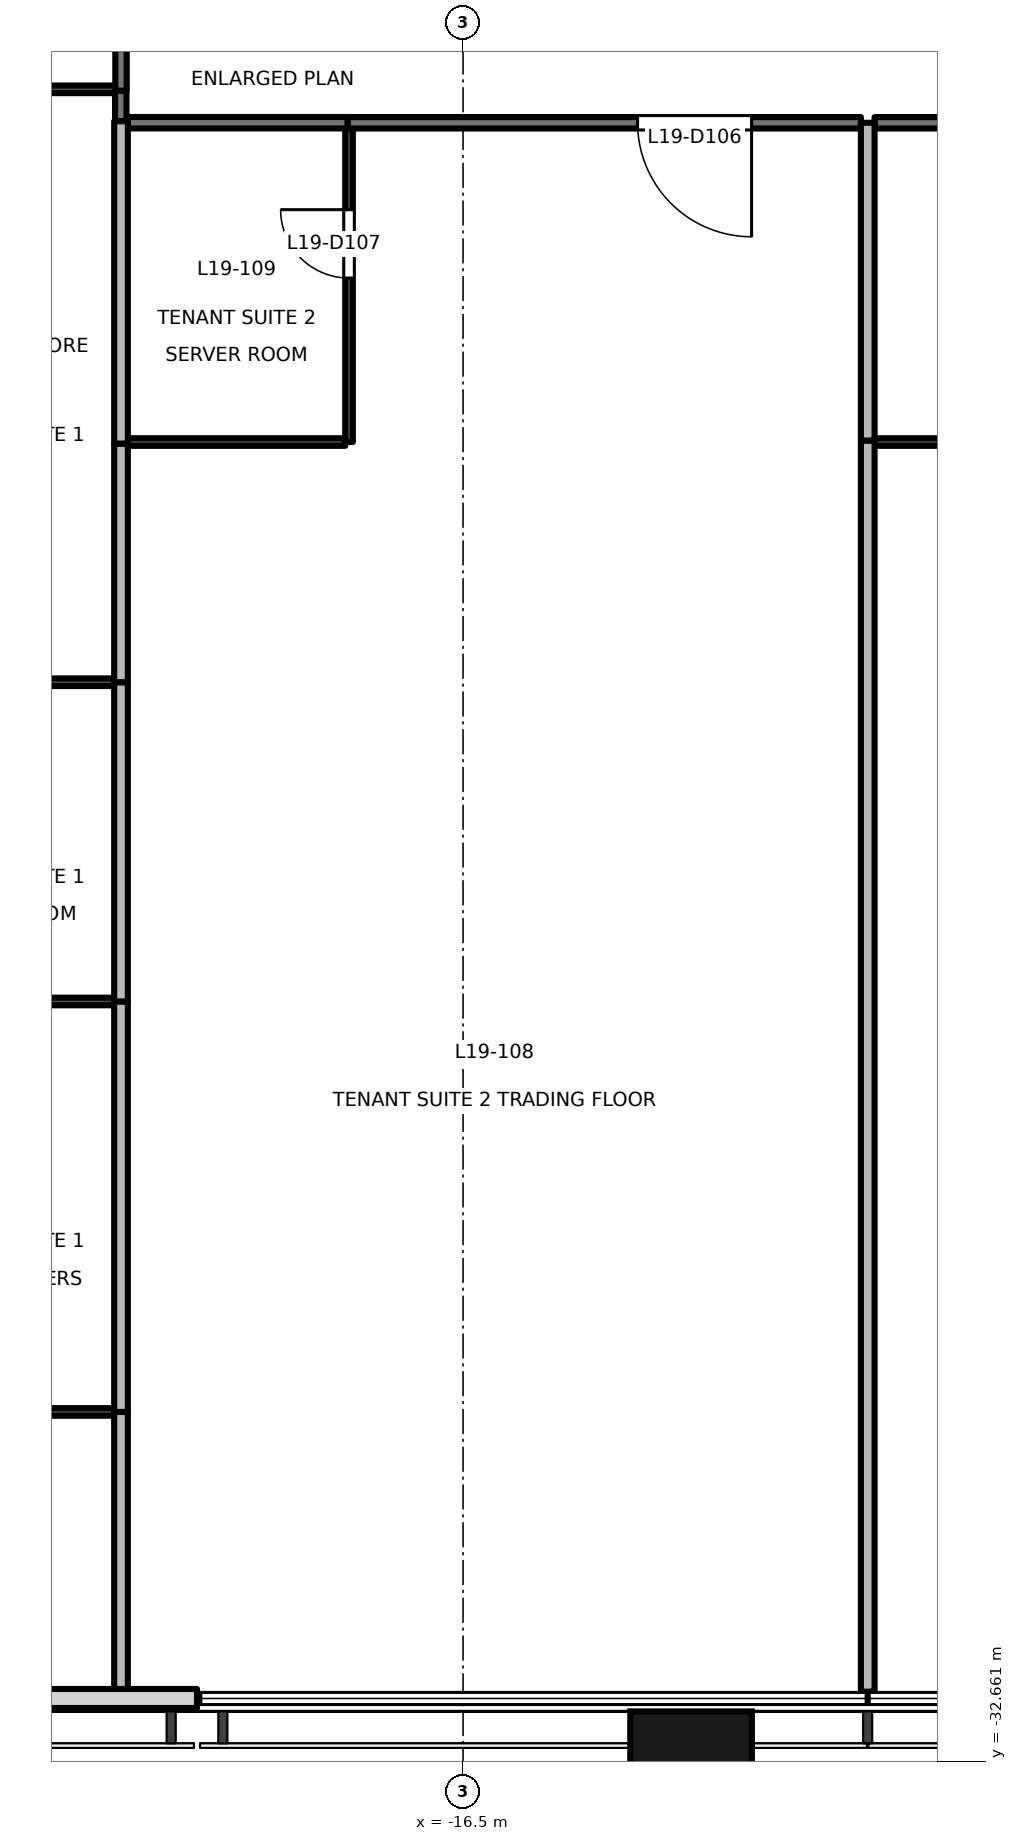
"""IFC4 building model, lengths in metres.
Left out: names, types, materials, properties, quantities, classifications, styles, units other than length and angle.
Written with IfcOpenShell. Run it as: python <this file> out.ifc"""

import sys

from ifc_helpers import new_model, si_unit, direction, frame, frame_2d, origin, origin_2d, place, context, subcontext, project, spatial, rectangle, extrude, element, fill, save


model = new_model("IFC4")
c1 = context("Model", 3, precision=1e-05, world=origin(), true_north=direction((0.0, 1.0)))
c2 = subcontext(c1, "Body", "Model", "MODEL_VIEW")
j1 = project(units=[si_unit("LENGTHUNIT", "METRE"), si_unit("PLANEANGLEUNIT", "RADIAN")], contexts=[c1])
p1 = place(None, origin())
s1 = spatial("IfcSite", under=j1, at=p1, CompositionType="ELEMENT")
p2 = place(p1, origin())
s2 = spatial("IfcBuilding", under=s1, at=p2, CompositionType="ELEMENT")
p3 = place(p2, frame((0.0, 0.0, 87.7)))
s3 = spatial("IfcBuildingStorey", under=s2, at=p3, CompositionType="ELEMENT", Elevation=87.7)
p4 = place(p3, frame((-13.5, -32.9, -0.2), z_axis=(0.0, 0.0, 1.0), x_axis=(1.0, 0.0, 0.0)))
e1 = element("IfcColumn", 1, at=p4, inside=s3, PredefinedType="COLUMN", context=c2, shape_type="SweptSolid", body=[
    extrude(rectangle(XDim=1.6, YDim=1.8, at=origin_2d()), origin(), (0.0, 0.0, 1.0), 4.0),
])
p5 = place(p3, frame((-22.955, -31.83, 0.0), z_axis=(0.0, 0.0, 1.0), x_axis=(1.0, 0.0, 0.0)))
e2 = element("IfcWall", 2, at=p5, inside=s3, PredefinedType="SOLIDWALL", context=c2, shape_type="SweptSolid", body=[
    extrude(rectangle(XDim=2.955, YDim=0.25, at=frame_2d((1.478, 0.0))), origin(), (0.0, 0.0, 1.0), 3.8),
])
p6 = place(p3, frame((-21.0, -10.68, 0.0), z_axis=(0.0, 0.0, 1.0), x_axis=(0.0, 1.0, 0.0)))
e3 = element("IfcWall", 3, at=p6, inside=s3, PredefinedType="PARTITIONING", context=c2, shape_type="SweptSolid", body=[
    extrude(rectangle(XDim=6.0, YDim=0.15, at=frame_2d((3.0, 0.0))), origin(), (0.0, 0.0, 1.0), 3.8),
])
p7 = place(p6, frame((3.7, 0.0, 0.0)))
e4 = element("IfcOpeningElement", 4, at=p7, cuts=e3, PredefinedType="OPENING", context=c2, shape_type="SweptSolid", body=[
    extrude(rectangle(XDim=0.9, YDim=2.1, at=frame_2d((0.45, 1.05))), frame((0.0, 0.085, 0.0), z_axis=(0.0, -1.0, 0.0), x_axis=(1.0, 0.0, 0.0)), (0.0, 0.0, 1.0), 0.171),
])
p8 = place(p3, frame((-21.003, -11.08, 0.0), z_axis=(0.0, 0.0, 1.0), x_axis=(0.0, 1.0, 0.0)))
e5 = element("IfcWall", 5, at=p8, inside=s3, PredefinedType="PARTITIONING", context=c2, shape_type="SweptSolid", body=[
    extrude(rectangle(XDim=0.4, YDim=0.15, at=frame_2d((0.2, 0.0))), origin(), (0.0, 0.0, 1.0), 3.8),
])
p9 = place(p3, frame((-11.266, -11.1, 0.0), z_axis=(0.0, 0.0, 1.0), x_axis=(-1.0, 0.0, 0.0)))
e6 = element("IfcWall", 6, at=p9, inside=s3, PredefinedType="PARTITIONING", context=c2, shape_type="SweptSolid", body=[
    extrude(rectangle(XDim=6.754, YDim=0.15, at=frame_2d((3.377, 0.0))), origin(), (0.0, 0.0, 1.0), 2.8),
])
p10 = place(p9, frame((1.438, 0.0, 0.0)))
e7 = element("IfcOpeningElement", 7, at=p10, cuts=e6, PredefinedType="OPENING", context=c2, shape_type="SweptSolid", body=[
    extrude(rectangle(XDim=1.5, YDim=2.1, at=frame_2d((0.75, 1.05))), frame((0.0, 0.085, 0.0), z_axis=(0.0, -1.0, 0.0), x_axis=(1.0, 0.0, 0.0)), (0.0, 0.0, 1.0), 0.171),
])
p11 = place(p3, frame((-18.02, -11.099, 0.0), z_axis=(0.0, 0.0, 1.0), x_axis=(-1.0, 0.0, 0.0)))
e8 = element("IfcWall", 8, at=p11, inside=s3, PredefinedType="PARTITIONING", context=c2, shape_type="SweptSolid", body=[
    extrude(rectangle(XDim=2.89, YDim=0.15, at=frame_2d((1.445, 0.0))), origin(), (0.0, 0.0, 1.0), 3.8),
])
p12 = place(p3, frame((-5.156, -11.1, 0.0), z_axis=(0.0, 0.0, 1.0), x_axis=(-1.0, 0.0, 0.0)))
e9 = element("IfcWall", 9, at=p12, inside=s3, PredefinedType="PARTITIONING", context=c2, shape_type="SweptSolid", body=[
    extrude(rectangle(XDim=5.93, YDim=0.15, at=frame_2d((2.965, 0.0))), origin(), (0.0, 0.0, 1.0), 2.8),
])
p13 = place(p3, frame((-23.95, -28.06, 0.0), z_axis=(0.0, 0.0, 1.0), x_axis=(1.0, 0.0, 0.0)))
e10 = element("IfcWall", 10, at=p13, inside=s3, PredefinedType="PARTITIONING", context=c2, shape_type="SweptSolid", body=[
    extrude(rectangle(XDim=2.86, YDim=0.1, at=frame_2d((1.43, 0.0))), origin(), (0.0, 0.0, 1.0), 3.8),
])
p14 = place(p3, frame((-21.075, -10.66, 0.0), z_axis=(0.0, 0.0, 1.0), x_axis=(-1.0, 0.0, 0.0)))
e11 = element("IfcWall", 11, at=p14, inside=s3, PredefinedType="PARTITIONING", context=c2, shape_type="SweptSolid", body=[
    extrude(rectangle(XDim=2.875, YDim=0.1, at=frame_2d((1.438, 0.0))), origin(), (0.0, 0.0, 1.0), 3.8),
])
p15 = place(p3, frame((-21.0, -28.06, 0.0), z_axis=(0.0, 0.0, 1.0), x_axis=(0.0, -1.0, 0.0)))
e12 = element("IfcWall", 12, at=p15, inside=s3, PredefinedType="PARTITIONING", context=c2, shape_type="SweptSolid", body=[
    extrude(rectangle(XDim=3.68, YDim=0.18, at=frame_2d((1.84, 0.0))), origin(), (0.0, 0.0, 1.0), 3.8),
])
p16 = place(p3, frame((-23.95, -22.66, 0.0), z_axis=(0.0, 0.0, 1.0), x_axis=(1.0, 0.0, 0.0)))
e13 = element("IfcWall", 13, at=p16, inside=s3, PredefinedType="PARTITIONING", context=c2, shape_type="SweptSolid", body=[
    extrude(rectangle(XDim=2.86, YDim=0.1, at=frame_2d((1.43, 0.0))), origin(), (0.0, 0.0, 1.0), 3.8),
])
p17 = place(p3, frame((-21.0, -22.66, 0.0), z_axis=(0.0, 0.0, 1.0), x_axis=(0.0, -1.0, 0.0)))
e14 = element("IfcWall", 14, at=p17, inside=s3, PredefinedType="PARTITIONING", context=c2, shape_type="SweptSolid", body=[
    extrude(rectangle(XDim=5.4, YDim=0.18, at=frame_2d((2.7, 0.0))), origin(), (0.0, 0.0, 1.0), 3.8),
])
p18 = place(p3, frame((-23.95, -18.46, 0.0), z_axis=(0.0, 0.0, 1.0), x_axis=(1.0, 0.0, 0.0)))
e15 = element("IfcWall", 15, at=p18, inside=s3, PredefinedType="PARTITIONING", context=c2, shape_type="SweptSolid", body=[
    extrude(rectangle(XDim=2.86, YDim=0.1, at=frame_2d((1.43, 0.0))), origin(), (0.0, 0.0, 1.0), 3.8),
])
p19 = place(p3, frame((-21.0, -18.46, 0.0), z_axis=(0.0, 0.0, 1.0), x_axis=(0.0, -1.0, 0.0)))
e16 = element("IfcWall", 16, at=p19, inside=s3, PredefinedType="PARTITIONING", context=c2, shape_type="SweptSolid", body=[
    extrude(rectangle(XDim=4.2, YDim=0.18, at=frame_2d((2.1, 0.0))), origin(), (0.0, 0.0, 1.0), 3.8),
])
p20 = place(p3, frame((-21.0, -15.32, 0.0), z_axis=(0.0, 0.0, 1.0), x_axis=(0.0, -1.0, 0.0)))
e17 = element("IfcWall", 17, at=p20, inside=s3, PredefinedType="PARTITIONING", context=c2, shape_type="SweptSolid", body=[
    extrude(rectangle(XDim=3.14, YDim=0.18, at=frame_2d((1.57, 0.0))), origin(), (0.0, 0.0, 1.0), 3.8),
])
p21 = place(p3, frame((-21.0, -11.08, 0.0), z_axis=(0.0, 0.0, 1.0), x_axis=(0.0, -1.0, 0.0)))
e18 = element("IfcWall", 18, at=p21, inside=s3, PredefinedType="PARTITIONING", context=c2, shape_type="SweptSolid", body=[
    extrude(rectangle(XDim=4.24, YDim=0.18, at=frame_2d((2.12, 0.0))), origin(), (0.0, 0.0, 1.0), 3.8),
])
p22 = place(p3, frame((-20.91, -15.3, 0.0), z_axis=(0.0, 0.0, 1.0), x_axis=(1.0, 0.0, 0.0)))
e19 = element("IfcWall", 19, at=p22, inside=s3, PredefinedType="PARTITIONING", context=c2, shape_type="SweptSolid", body=[
    extrude(rectangle(XDim=2.86, YDim=0.1, at=frame_2d((1.43, 0.0))), origin(), (0.0, 0.0, 1.0), 3.8),
])
p23 = place(p3, frame((-18.0, -15.3, 0.0), z_axis=(0.0, 0.0, 1.0), x_axis=(0.0, 1.0, 0.0)))
e20 = element("IfcWall", 20, at=p23, inside=s3, PredefinedType="PARTITIONING", context=c2, shape_type="SweptSolid", body=[
    extrude(rectangle(XDim=4.125, YDim=0.1, at=frame_2d((2.062, 0.0))), origin(), (0.0, 0.0, 1.0), 3.8),
])
p24 = place(p23, frame((2.157, 0.0, 0.0)))
e21 = element("IfcOpeningElement", 21, at=p24, cuts=e20, PredefinedType="OPENING", context=c2, shape_type="SweptSolid", body=[
    extrude(rectangle(XDim=0.9, YDim=2.1, at=frame_2d((0.45, 1.05))), frame((0.0, 0.061, 0.0), z_axis=(0.0, -1.0, 0.0), x_axis=(1.0, 0.0, 0.0)), (0.0, 0.0, 1.0), 0.121),
])
p25 = place(p3, frame((-11.176, -15.28, 0.0), z_axis=(0.0, 0.0, 1.0), x_axis=(0.0, -1.0, 0.0)))
e22 = element("IfcWall", 22, at=p25, inside=s3, PredefinedType="PARTITIONING", context=c2, shape_type="SweptSolid", body=[
    extrude(rectangle(XDim=16.46, YDim=0.18, at=frame_2d((8.23, 0.0))), origin(), (0.0, 0.0, 1.0), 3.8),
])
p26 = place(p3, frame((-11.176, -11.1, 0.0), z_axis=(0.0, 0.0, 1.0), x_axis=(0.0, -1.0, 0.0)))
e23 = element("IfcWall", 23, at=p26, inside=s3, PredefinedType="PARTITIONING", context=c2, shape_type="SweptSolid", body=[
    extrude(rectangle(XDim=4.18, YDim=0.18, at=frame_2d((2.09, 0.0))), origin(), (0.0, 0.0, 1.0), 3.8),
])
p27 = place(p3, frame((-11.086, -15.3, 0.0), z_axis=(0.0, 0.0, 1.0), x_axis=(1.0, 0.0, 0.0)))
e24 = element("IfcWall", 24, at=p27, inside=s3, PredefinedType="PARTITIONING", context=c2, shape_type="SweptSolid", body=[
    extrude(rectangle(XDim=5.91, YDim=0.1, at=frame_2d((2.955, 0.0))), origin(), (0.0, 0.0, 1.0), 2.8),
])
p28 = place(p27, frame((1.633, 0.0, 0.0)))
e25 = element("IfcOpeningElement", 25, at=p28, cuts=e24, PredefinedType="OPENING", context=c2, shape_type="SweptSolid", body=[
    extrude(rectangle(XDim=0.8, YDim=2.1, at=frame_2d((0.4, 1.05))), frame((0.0, 0.061, 0.0), z_axis=(0.0, -1.0, 0.0), x_axis=(1.0, 0.0, 0.0)), (0.0, 0.0, 1.0), 0.121),
])
p29 = place(p10, origin())
e26 = element("IfcDoor", 26, at=p29, inside=s3, OperationType="DOUBLE_DOOR_SINGLE_SWING", PredefinedType="DOOR", context=c2, shape_type="SweptSolid", body=[
    extrude(rectangle(XDim=1.5, YDim=2.1, at=frame_2d((0.75, 1.05))), frame((0.0, 0.025, 0.0), z_axis=(0.0, -1.0, 0.0), x_axis=(1.0, 0.0, 0.0)), (0.0, 0.0, 1.0), 0.05),
])
fill(e7, e26)
p30 = place(p24, origin())
e27 = element("IfcDoor", 27, at=p30, inside=s3, OperationType="SINGLE_SWING_RIGHT", PredefinedType="DOOR", context=c2, shape_type="SweptSolid", body=[
    extrude(rectangle(XDim=0.9, YDim=2.1, at=frame_2d((0.45, 1.05))), frame((0.0, 0.025, 0.0), z_axis=(0.0, -1.0, 0.0), x_axis=(1.0, 0.0, 0.0)), (0.0, 0.0, 1.0), 0.05),
])
fill(e21, e27)
save(model, sys.argv[1])
